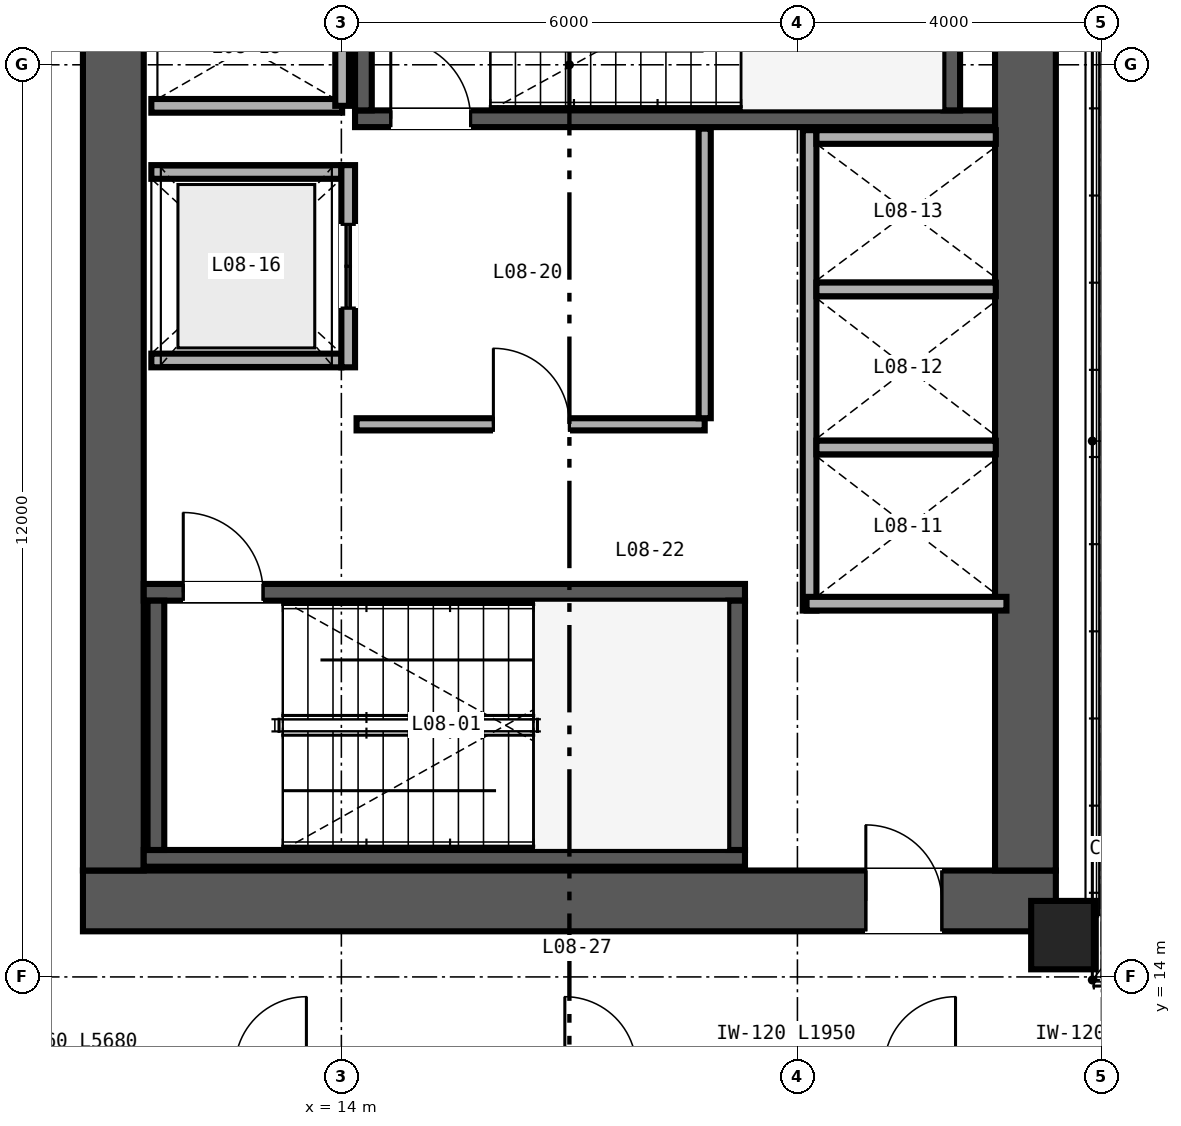
"""IFC4 building model, lengths in metres.
Left out: names, types, materials, properties, quantities, classifications, styles, units other than length and angle.
Written with IfcOpenShell. Run it as: python <this file> out.ifc"""

import sys

from ifc_helpers import new_model, si_unit, direction, frame, frame_2d, origin, origin_2d, place, context, subcontext, project, spatial, rectangle, hollow_rectangle, extrude, source, transform, mapped, element, fill, save


model = new_model("IFC4")
c1 = context("Model", 3, precision=1e-05, world=origin(), true_north=direction((0.0, 1.0)))
c2 = subcontext(c1, "Body", "Model", "MODEL_VIEW")
j1 = project(units=[si_unit("LENGTHUNIT", "METRE"), si_unit("PLANEANGLEUNIT", "RADIAN")], contexts=[c1])
p1 = place(None, origin())
s1 = spatial("IfcSite", under=j1, at=p1, CompositionType="ELEMENT")
p2 = place(p1, origin())
s2 = spatial("IfcBuilding", under=s1, at=p2, CompositionType="ELEMENT")
p3 = place(p2, frame((0.0, 0.0, 38.4)))
s3 = spatial("IfcBuildingStorey", under=s2, at=p3, CompositionType="ELEMENT", Elevation=38.4)
p4 = place(p3, frame((10.6, 15.0, 0.0), z_axis=(0.0, 0.0, 1.0), x_axis=(1.0, 0.0, 0.0)))
e1 = element("IfcWall", 1, at=p4, inside=s3, PredefinedType="SHEAR", context=c2, shape_type="SweptSolid", body=[
    extrude(rectangle(XDim=12.8, YDim=0.8, at=frame_2d((6.4, 0.0))), origin(), (0.0, 0.0, 1.0), 3.35),
])
p5 = place(p4, frame((10.3, 0.0, 0.0)))
e2 = element("IfcOpeningElement", 2, at=p5, cuts=e1, PredefinedType="OPENING", context=c2, shape_type="SweptSolid", body=[
    extrude(rectangle(XDim=1.0, YDim=2.15, at=frame_2d((0.5, 1.075))), frame((0.0, 0.41, 0.0), z_axis=(0.0, -1.0, 0.0), x_axis=(1.0, 0.0, 0.0)), (0.0, 0.0, 1.0), 0.82),
])
for number, where, z_axis, x_axis in (
    (3, (11.0, 15.4, 0.0), (0.0, 0.0, 1.0), (0.0, 1.0, 0.0)),
    (4, (23.0, 15.4, 0.0), (0.0, 0.0, 1.0), (0.0, 1.0, 0.0)),
):
    element("IfcWall", number, at=place(p3, frame(where, z_axis=z_axis, x_axis=x_axis)), inside=s3, PredefinedType="SHEAR", context=c2, shape_type="SweptSolid", body=[
        extrude(rectangle(XDim=21.2, YDim=0.8, at=frame_2d((10.6, 0.0))), origin(), (0.0, 0.0, 1.0), 3.35),
    ])
p6 = place(p3, frame((11.4, 15.56, 0.0), z_axis=(0.0, 0.0, 1.0), x_axis=(1.0, 0.0, 0.0)))
e5 = element("IfcWall", 5, at=p6, inside=s3, PredefinedType="SHEAR", context=c2, shape_type="SweptSolid", body=[
    extrude(rectangle(XDim=7.91, YDim=0.22, at=frame_2d((3.955, 0.0))), origin(), (0.0, 0.0, 1.0), 3.4),
])
p7 = place(p3, frame((11.4, 19.06, 0.0), z_axis=(0.0, 0.0, 1.0), x_axis=(1.0, 0.0, 0.0)))
e6 = element("IfcWall", 6, at=p7, inside=s3, PredefinedType="SHEAR", context=c2, shape_type="SweptSolid", body=[
    extrude(rectangle(XDim=7.91, YDim=0.22, at=frame_2d((3.955, 0.0))), origin(), (0.0, 0.0, 1.0), 3.4),
])
p8 = place(p7, frame((0.52, 0.0, 0.0)))
e7 = element("IfcOpeningElement", 7, at=p8, cuts=e6, PredefinedType="OPENING", context=c2, shape_type="SweptSolid", body=[
    extrude(rectangle(XDim=1.05, YDim=2.15, at=frame_2d((0.525, 1.075))), frame((0.0, 0.12, 0.0), z_axis=(0.0, -1.0, 0.0), x_axis=(1.0, 0.0, 0.0)), (0.0, 0.0, 1.0), 0.24),
])
for number, where, z_axis, x_axis in (
    (8, (11.56, 15.67, 0.0), (0.0, 0.0, 1.0), (0.0, 1.0, 0.0)),
    (9, (19.2, 15.67, 0.0), (0.0, 0.0, 1.0), (0.0, 1.0, 0.0)),
):
    element("IfcWall", number, at=place(p3, frame(where, z_axis=z_axis, x_axis=x_axis)), inside=s3, PredefinedType="SHEAR", context=c2, shape_type="SweptSolid", body=[
        extrude(rectangle(XDim=3.28, YDim=0.22, at=frame_2d((1.64, 0.0))), origin(), (0.0, 0.0, 1.0), 3.4),
    ])
p9 = place(p3, frame((14.18, 25.29, 0.0), z_axis=(0.0, 0.0, 1.0), x_axis=(1.0, 0.0, 0.0)))
e10 = element("IfcWall", 10, at=p9, inside=s3, PredefinedType="SHEAR", context=c2, shape_type="SweptSolid", body=[
    extrude(rectangle(XDim=8.42, YDim=0.22, at=frame_2d((4.21, 0.0))), origin(), (0.0, 0.0, 1.0), 3.4),
])
p10 = place(p9, frame((0.47, 0.0, 0.0)))
e11 = element("IfcOpeningElement", 11, at=p10, cuts=e10, PredefinedType="OPENING", context=c2, shape_type="SweptSolid", body=[
    extrude(rectangle(XDim=1.05, YDim=2.15, at=frame_2d((0.525, 1.075))), frame((0.0, 0.12, 0.0), z_axis=(0.0, -1.0, 0.0), x_axis=(1.0, 0.0, 0.0)), (0.0, 0.0, 1.0), 0.24),
])
for number, where, z_axis, x_axis in (
    (12, (14.29, 25.4, 0.0), (0.0, 0.0, 1.0), (0.0, 1.0, 0.0)),
    (13, (22.03, 25.4, 0.0), (0.0, 0.0, 1.0), (0.0, 1.0, 0.0)),
):
    element("IfcWall", number, at=place(p3, frame(where, z_axis=z_axis, x_axis=x_axis)), inside=s3, PredefinedType="SHEAR", context=c2, shape_type="SweptSolid", body=[
        extrude(rectangle(XDim=3.28, YDim=0.22, at=frame_2d((1.64, 0.0))), origin(), (0.0, 0.0, 1.0), 3.4),
    ])
m1 = source(origin(), c2, "Body", "SweptSolid", [
    extrude(hollow_rectangle(XDim=0.85, YDim=0.9, WallThickness=0.04, at=origin_2d()), origin(), (0.0, 0.0, 1.0), 3.35),
])
p11 = place(p3, frame((23.5, 14.55, 0.0), z_axis=(0.0, 0.0, 1.0), x_axis=(1.0, 0.0, 0.0)))
e14 = element("IfcColumn", 14, at=p11, inside=s3, PredefinedType="COLUMN", context=c2, shape_type="MappedRepresentation", body=[
    mapped(m1, transform((0.0, 0.0, 0.0), scale=1.0)),
])
p12 = place(p3, frame((20.16, 18.82, 0.0), z_axis=(0.0, 0.0, 1.0), x_axis=(0.0, 1.0, 0.0)))
e15 = element("IfcWall", 15, at=p12, inside=s3, PredefinedType="SOLIDWALL", context=c2, shape_type="SweptSolid", body=[
    extrude(rectangle(XDim=6.32, YDim=0.18, at=frame_2d((3.16, 0.0))), origin(), (0.0, 0.0, 1.0), 2.36),
])
p13 = place(p3, frame((20.12, 18.91, 0.0), z_axis=(0.0, 0.0, 1.0), x_axis=(1.0, 0.0, 0.0)))
e16 = element("IfcWall", 16, at=p13, inside=s3, PredefinedType="SOLIDWALL", context=c2, shape_type="SweptSolid", body=[
    extrude(rectangle(XDim=2.63, YDim=0.18, at=frame_2d((1.315, 0.0))), origin(), (0.0, 0.0, 1.0), 3.35),
])
p14 = place(p3, frame((20.25, 25.05, 0.0), z_axis=(0.0, 0.0, 1.0), x_axis=(1.0, 0.0, 0.0)))
e17 = element("IfcWall", 17, at=p14, inside=s3, PredefinedType="SOLIDWALL", context=c2, shape_type="SweptSolid", body=[
    extrude(rectangle(XDim=2.36, YDim=0.18, at=frame_2d((1.18, 0.0))), origin(), (0.0, 0.0, 1.0), 3.35),
])
p15 = place(p3, frame((20.25, 20.965, 0.0), z_axis=(0.0, 0.0, 1.0), x_axis=(1.0, 0.0, 0.0)))
e18 = element("IfcWall", 18, at=p15, inside=s3, PredefinedType="SOLIDWALL", context=c2, shape_type="SweptSolid", body=[
    extrude(rectangle(XDim=2.36, YDim=0.18, at=frame_2d((1.18, 0.0))), origin(), (0.0, 0.0, 1.0), 2.36),
])
p16 = place(p3, frame((20.25, 23.045, 0.0), z_axis=(0.0, 0.0, 1.0), x_axis=(1.0, 0.0, 0.0)))
e19 = element("IfcWall", 19, at=p16, inside=s3, PredefinedType="SOLIDWALL", context=c2, shape_type="SweptSolid", body=[
    extrude(rectangle(XDim=2.36, YDim=0.18, at=frame_2d((1.18, 0.0))), origin(), (0.0, 0.0, 1.0), 3.35),
])
for number, where, z_axis, x_axis in (
    (20, (11.5, 22.11, 0.0), (0.0, 0.0, 1.0), (1.0, 0.0, 0.0)),
    (21, (11.5, 24.59, 0.0), (0.0, 0.0, 1.0), (1.0, 0.0, 0.0)),
):
    element("IfcWall", number, at=place(p3, frame(where, z_axis=z_axis, x_axis=x_axis)), inside=s3, PredefinedType="SOLIDWALL", context=c2, shape_type="SweptSolid", body=[
        extrude(rectangle(XDim=2.5, YDim=0.18, at=frame_2d((1.25, 0.0))), origin(), (0.0, 0.0, 1.0), 3.35),
    ])
p17 = place(p3, frame((14.09, 22.02, 0.0), z_axis=(0.0, 0.0, 1.0), x_axis=(0.0, 1.0, 0.0)))
e22 = element("IfcWall", 22, at=p17, inside=s3, PredefinedType="SOLIDWALL", context=c2, shape_type="SweptSolid", body=[
    extrude(rectangle(XDim=2.66, YDim=0.18, at=frame_2d((1.33, 0.0))), origin(), (0.0, 0.0, 1.0), 3.35),
])
p18 = place(p17, frame((0.78, 0.0, 0.0)))
e23 = element("IfcOpeningElement", 23, at=p18, cuts=e22, PredefinedType="OPENING", context=c2, shape_type="SweptSolid", body=[
    extrude(rectangle(XDim=1.1, YDim=2.2, at=frame_2d((0.55, 1.1))), frame((0.0, 0.1, 0.0), z_axis=(0.0, -1.0, 0.0), x_axis=(1.0, 0.0, 0.0)), (0.0, 0.0, 1.0), 0.2),
])
p19 = place(p3, frame((11.5, 25.46, 0.0), z_axis=(0.0, 0.0, 1.0), x_axis=(1.0, 0.0, 0.0)))
e24 = element("IfcWall", 24, at=p19, inside=s3, PredefinedType="SOLIDWALL", context=c2, shape_type="SweptSolid", body=[
    extrude(rectangle(XDim=2.51, YDim=0.18, at=frame_2d((1.255, 0.0))), origin(), (0.0, 0.0, 1.0), 3.35),
])
p20 = place(p3, frame((14.01, 25.46, 0.0), z_axis=(0.0, 0.0, 1.0), x_axis=(0.0, 1.0, 0.0)))
e25 = element("IfcWall", 25, at=p20, inside=s3, PredefinedType="SOLIDWALL", context=c2, shape_type="SweptSolid", body=[
    extrude(rectangle(XDim=3.08, YDim=0.18, at=frame_2d((1.54, 0.0))), origin(), (0.0, 0.0, 1.0), 3.35),
])
p21 = place(p3, frame((14.2, 21.27, 0.0), z_axis=(0.0, 0.0, 1.0), x_axis=(1.0, 0.0, 0.0)))
e26 = element("IfcWall", 26, at=p21, inside=s3, PredefinedType="PARTITIONING", context=c2, shape_type="SweptSolid", body=[
    extrude(rectangle(XDim=4.58, YDim=0.16, at=frame_2d((2.29, 0.0))), origin(), (0.0, 0.0, 1.0), 3.35),
])
p22 = place(p21, frame((1.8, 0.0, 0.0)))
e27 = element("IfcOpeningElement", 27, at=p22, cuts=e26, PredefinedType="OPENING", context=c2, shape_type="SweptSolid", body=[
    extrude(rectangle(XDim=1.0, YDim=2.15, at=frame_2d((0.5, 1.075))), frame((0.0, 0.09, 0.0), z_axis=(0.0, -1.0, 0.0), x_axis=(1.0, 0.0, 0.0)), (0.0, 0.0, 1.0), 0.18),
])
p23 = place(p3, frame((18.78, 21.35, 0.0), z_axis=(0.0, 0.0, 1.0), x_axis=(0.0, 1.0, 0.0)))
e28 = element("IfcWall", 28, at=p23, inside=s3, PredefinedType="PARTITIONING", context=c2, shape_type="SweptSolid", body=[
    extrude(rectangle(XDim=3.81, YDim=0.16, at=frame_2d((1.905, 0.0))), origin(), (0.0, 0.0, 1.0), 3.35),
])
m2 = source(origin(), c2, "Body", "SweptSolid", [
    extrude(rectangle(XDim=1.05, YDim=2.15, at=frame_2d((0.525, 1.075))), frame((0.0, 0.025, 0.0), z_axis=(0.0, -1.0, 0.0), x_axis=(1.0, 0.0, 0.0)), (0.0, 0.0, 1.0), 0.05),
])
p24 = place(p8, origin())
e29 = element("IfcDoor", 29, at=p24, inside=s3, OperationType="SINGLE_SWING_LEFT", PredefinedType="DOOR", context=c2, shape_type="MappedRepresentation", body=[
    mapped(m2, transform((0.0, 0.0, 0.0), scale=1.0)),
])
fill(e7, e29)
p25 = place(p10, origin())
e30 = element("IfcDoor", 30, at=p25, inside=s3, OperationType="SINGLE_SWING_LEFT", PredefinedType="DOOR", context=c2, shape_type="MappedRepresentation", body=[
    mapped(m2, transform((0.0, 0.0, 0.0), scale=1.0)),
])
fill(e11, e30)
m3 = source(origin(), c2, "Body", "SweptSolid", [
    extrude(rectangle(XDim=1.1, YDim=2.2, at=frame_2d((0.55, 1.1))), frame((0.0, 0.025, 0.0), z_axis=(0.0, -1.0, 0.0), x_axis=(1.0, 0.0, 0.0)), (0.0, 0.0, 1.0), 0.05),
])
p26 = place(p18, origin())
e31 = element("IfcDoor", 31, at=p26, inside=s3, OperationType="DOUBLE_DOOR_SLIDING", PredefinedType="DOOR", context=c2, shape_type="MappedRepresentation", body=[
    mapped(m3, transform((0.0, 0.0, 0.0), scale=1.0)),
])
fill(e23, e31)
m4 = source(origin(), c2, "Body", "SweptSolid", [
    extrude(rectangle(XDim=1.0, YDim=2.15, at=frame_2d((0.5, 1.075))), frame((0.0, 0.025, 0.0), z_axis=(0.0, -1.0, 0.0), x_axis=(1.0, 0.0, 0.0)), (0.0, 0.0, 1.0), 0.05),
])
p27 = place(p22, origin())
e32 = element("IfcDoor", 32, at=p27, inside=s3, OperationType="SINGLE_SWING_LEFT", PredefinedType="DOOR", context=c2, shape_type="MappedRepresentation", body=[
    mapped(m4, transform((0.0, 0.0, 0.0), scale=1.0)),
])
fill(e27, e32)
p28 = place(p5, origin())
e33 = element("IfcDoor", 33, at=p28, inside=s3, OperationType="SINGLE_SWING_LEFT", PredefinedType="DOOR", context=c2, shape_type="MappedRepresentation", body=[
    mapped(m4, transform((0.0, 0.0, 0.0), scale=1.0)),
])
fill(e2, e33)
save(model, sys.argv[1])
